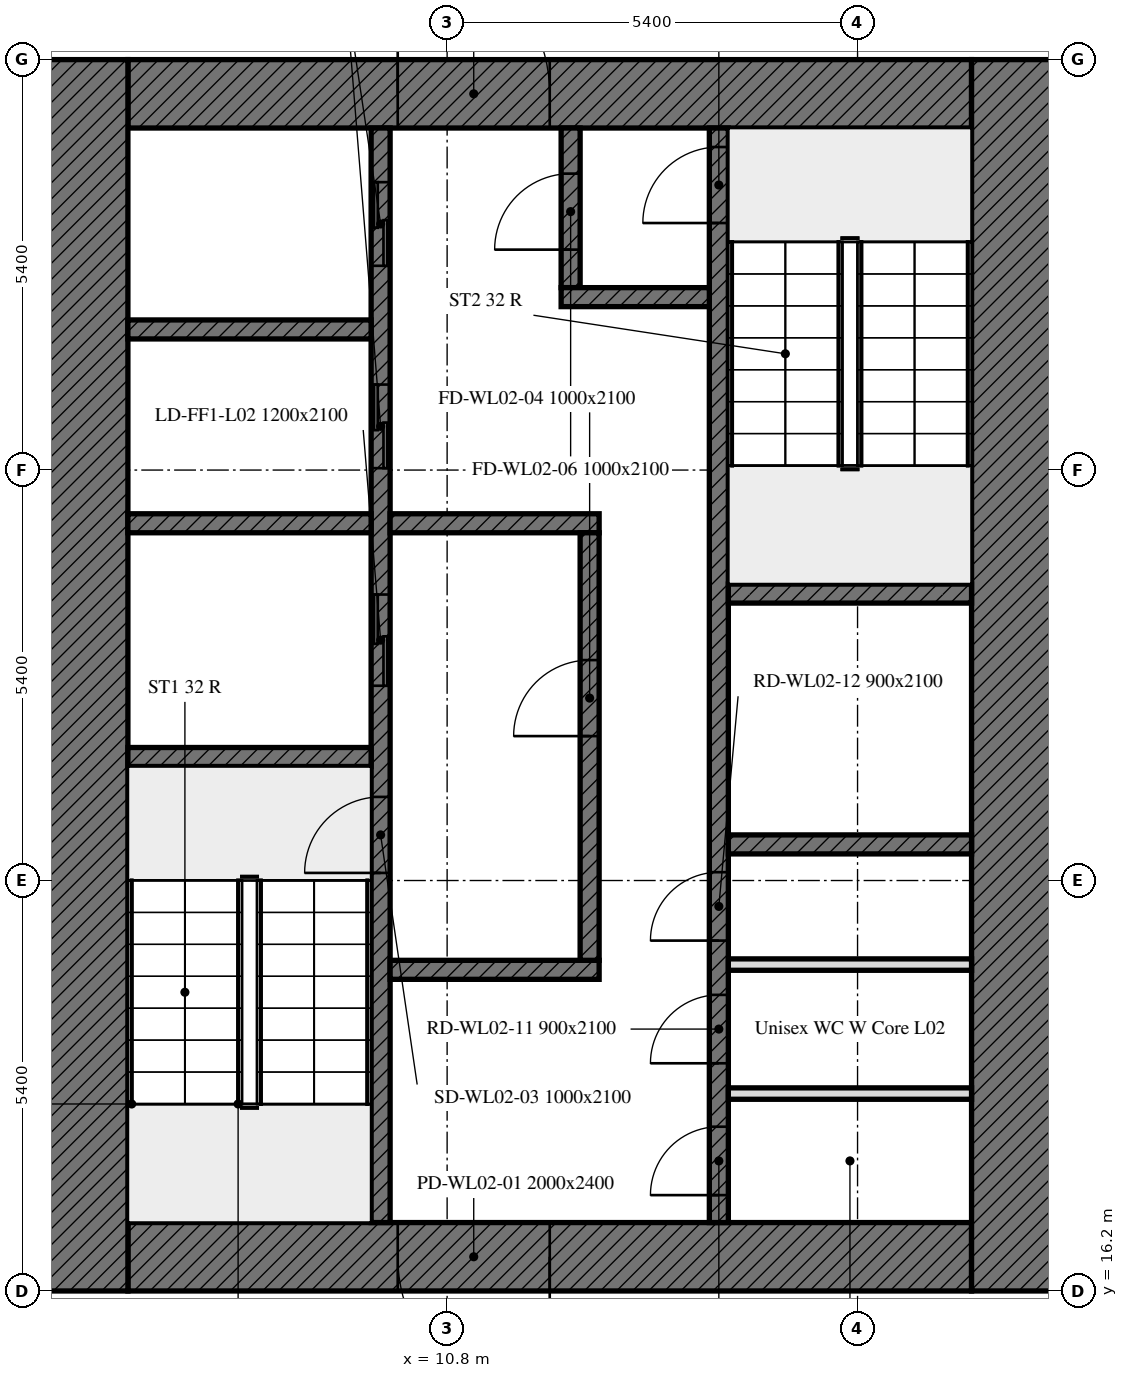
"""IFC4 building model, lengths in metres.
Left out: names, types, materials, properties, quantities, classifications, styles, units other than length and angle.
Written with IfcOpenShell. Run it as: python <this file> out.ifc"""

import sys

from ifc_helpers import new_model, si_unit, direction, frame, frame_2d, origin, place, context, subcontext, project, spatial, rectangle, extrude, element, fill, save


model = new_model("IFC4")
c1 = context("Model", 3, precision=1e-05, world=origin(), true_north=direction((0.0, 1.0)))
c2 = subcontext(c1, "Body", "Model", "MODEL_VIEW")
j1 = project(units=[si_unit("LENGTHUNIT", "METRE"), si_unit("PLANEANGLEUNIT", "RADIAN")], contexts=[c1])
p1 = place(None, origin())
s1 = spatial("IfcSite", under=j1, at=p1, CompositionType="ELEMENT")
p2 = place(p1, origin())
s2 = spatial("IfcBuilding", under=s1, at=p2, CompositionType="ELEMENT")
p3 = place(p2, frame((0.0, 0.0, 14.4)))
s3 = spatial("IfcBuildingStorey", under=s2, at=p3, CompositionType="ELEMENT", Elevation=14.4)
p4 = place(p3, frame((17.7, 16.65, 0.0), z_axis=(0.0, 0.0, 1.0), x_axis=(-1.0, 0.0, 0.0)))
e1 = element("IfcWall", 1, at=p4, inside=s3, PredefinedType="SOLIDWALL", context=c2, shape_type="SweptSolid", body=[
    extrude(rectangle(XDim=11.1, YDim=0.9, at=frame_2d((5.55, 0.0))), origin(), (0.0, 0.0, 1.0), 5.0),
])
p5 = place(p4, frame((5.55, 0.0, 0.0)))
e2 = element("IfcOpeningElement", 2, at=p5, cuts=e1, PredefinedType="OPENING", context=c2, shape_type="SweptSolid", body=[
    extrude(rectangle(XDim=2.0, YDim=2.4, at=frame_2d((1.0, 1.2))), frame((0.0, 0.45, 0.0), z_axis=(0.0, -1.0, 0.0), x_axis=(1.0, 0.0, 0.0)), (0.0, 0.0, 1.0), 0.9),
])
p6 = place(p3, frame((6.6, 31.95, 0.0), z_axis=(0.0, 0.0, 1.0), x_axis=(1.0, 0.0, 0.0)))
e3 = element("IfcWall", 3, at=p6, inside=s3, PredefinedType="SOLIDWALL", context=c2, shape_type="SweptSolid", body=[
    extrude(rectangle(XDim=11.1, YDim=0.9, at=frame_2d((5.55, 0.0))), origin(), (0.0, 0.0, 1.0), 5.0),
])
p7 = place(p6, frame((3.55, 0.0, 0.0)))
e4 = element("IfcOpeningElement", 4, at=p7, cuts=e3, PredefinedType="OPENING", context=c2, shape_type="SweptSolid", body=[
    extrude(rectangle(XDim=2.0, YDim=2.4, at=frame_2d((1.0, 1.2))), frame((0.0, 0.45, 0.0), z_axis=(0.0, -1.0, 0.0), x_axis=(1.0, 0.0, 0.0)), (0.0, 0.0, 1.0), 0.9),
])
for number, where, z_axis, x_axis in (
    (5, (6.0, 16.2, 0.0), (0.0, 0.0, 1.0), (0.0, 1.0, 0.0)),
    (6, (18.3, 32.4, 0.0), (0.0, 0.0, 1.0), (0.0, -1.0, 0.0)),
):
    element("IfcWall", number, at=place(p3, frame(where, z_axis=z_axis, x_axis=x_axis)), inside=s3, PredefinedType="SOLIDWALL", context=c2, shape_type="SweptSolid", body=[
        extrude(rectangle(XDim=16.2, YDim=1.2, at=frame_2d((8.1, 0.0))), origin(), (0.0, 0.0, 1.0), 5.0),
    ])
p8 = place(p3, frame((9.925, 17.1, 0.0), z_axis=(0.0, 0.0, 1.0), x_axis=(0.0, 1.0, 0.0)))
e7 = element("IfcWall", 7, at=p8, inside=s3, PredefinedType="SOLIDWALL", context=c2, shape_type="SweptSolid", body=[
    extrude(rectangle(XDim=14.4, YDim=0.25, at=frame_2d((7.2, 0.0))), origin(), (0.0, 0.0, 1.0), 5.0),
])
p9 = place(p8, frame((4.6, 0.0, 0.0)))
e8 = element("IfcOpeningElement", 8, at=p9, cuts=e7, PredefinedType="OPENING", context=c2, shape_type="SweptSolid", body=[
    extrude(rectangle(XDim=1.0, YDim=2.1, at=frame_2d((0.5, 1.05))), frame((0.0, 0.125, 0.0), z_axis=(0.0, -1.0, 0.0), x_axis=(1.0, 0.0, 0.0)), (0.0, 0.0, 1.0), 0.25),
])
p10 = place(p8, frame((7.062, 0.0, 0.0)))
e9 = element("IfcOpeningElement", 9, at=p10, cuts=e7, PredefinedType="OPENING", context=c2, shape_type="SweptSolid", body=[
    extrude(rectangle(XDim=1.2, YDim=2.1, at=frame_2d((0.6, 1.05))), frame((0.0, 0.125, 0.0), z_axis=(0.0, -1.0, 0.0), x_axis=(1.0, 0.0, 0.0)), (0.0, 0.0, 1.0), 0.25),
])
p11 = place(p8, frame((9.925, 0.0, 0.0)))
e10 = element("IfcOpeningElement", 10, at=p11, cuts=e7, PredefinedType="OPENING", context=c2, shape_type="SweptSolid", body=[
    extrude(rectangle(XDim=1.1, YDim=2.1, at=frame_2d((0.55, 1.05))), frame((0.0, 0.125, 0.0), z_axis=(0.0, -1.0, 0.0), x_axis=(1.0, 0.0, 0.0)), (0.0, 0.0, 1.0), 0.25),
])
p12 = place(p8, frame((12.587, 0.0, 0.0)))
e11 = element("IfcOpeningElement", 11, at=p12, cuts=e7, PredefinedType="OPENING", context=c2, shape_type="SweptSolid", body=[
    extrude(rectangle(XDim=1.1, YDim=2.1, at=frame_2d((0.55, 1.05))), frame((0.0, 0.125, 0.0), z_axis=(0.0, -1.0, 0.0), x_axis=(1.0, 0.0, 0.0)), (0.0, 0.0, 1.0), 0.25),
])
p13 = place(p3, frame((14.375, 17.1, 0.0), z_axis=(0.0, 0.0, 1.0), x_axis=(0.0, 1.0, 0.0)))
e12 = element("IfcWall", 12, at=p13, inside=s3, PredefinedType="SOLIDWALL", context=c2, shape_type="SweptSolid", body=[
    extrude(rectangle(XDim=14.4, YDim=0.25, at=frame_2d((7.2, 0.0))), origin(), (0.0, 0.0, 1.0), 5.0),
])
p14 = place(p13, frame((13.15, 0.0, 0.0)))
e13 = element("IfcOpeningElement", 13, at=p14, cuts=e12, PredefinedType="OPENING", context=c2, shape_type="SweptSolid", body=[
    extrude(rectangle(XDim=1.0, YDim=2.1, at=frame_2d((0.5, 1.05))), frame((0.0, 0.125, 0.0), z_axis=(0.0, -1.0, 0.0), x_axis=(1.0, 0.0, 0.0)), (0.0, 0.0, 1.0), 0.25),
])
p15 = place(p13, frame((0.361, 0.0, 0.0)))
e14 = element("IfcOpeningElement", 14, at=p15, cuts=e12, PredefinedType="OPENING", context=c2, shape_type="SweptSolid", body=[
    extrude(rectangle(XDim=0.9, YDim=2.1, at=frame_2d((0.45, 1.05))), frame((0.0, 0.125, 0.0), z_axis=(0.0, -1.0, 0.0), x_axis=(1.0, 0.0, 0.0)), (0.0, 0.0, 1.0), 0.25),
])
p16 = place(p13, frame((2.095, 0.0, 0.0)))
e15 = element("IfcOpeningElement", 15, at=p16, cuts=e12, PredefinedType="OPENING", context=c2, shape_type="SweptSolid", body=[
    extrude(rectangle(XDim=0.9, YDim=2.1, at=frame_2d((0.45, 1.05))), frame((0.0, 0.125, 0.0), z_axis=(0.0, -1.0, 0.0), x_axis=(1.0, 0.0, 0.0)), (0.0, 0.0, 1.0), 0.25),
])
p17 = place(p13, frame((3.709, 0.0, 0.0)))
e16 = element("IfcOpeningElement", 16, at=p17, cuts=e12, PredefinedType="OPENING", context=c2, shape_type="SweptSolid", body=[
    extrude(rectangle(XDim=0.9, YDim=2.1, at=frame_2d((0.45, 1.05))), frame((0.0, 0.125, 0.0), z_axis=(0.0, -1.0, 0.0), x_axis=(1.0, 0.0, 0.0)), (0.0, 0.0, 1.0), 0.25),
])
for number, where, z_axis, x_axis in (
    (17, (6.6, 23.225, 0.0), (0.0, 0.0, 1.0), (1.0, 0.0, 0.0)),
    (18, (14.5, 25.375, 0.0), (0.0, 0.0, 1.0), (1.0, 0.0, 0.0)),
    (19, (14.5, 22.075, 0.0), (0.0, 0.0, 1.0), (1.0, 0.0, 0.0)),
    (20, (6.6, 26.3, 0.0), (0.0, 0.0, 1.0), (1.0, 0.0, 0.0)),
):
    element("IfcWall", number, at=place(p3, frame(where, z_axis=z_axis, x_axis=x_axis)), inside=s3, PredefinedType="SOLIDWALL", context=c2, shape_type="SweptSolid", body=[
        extrude(rectangle(XDim=3.2, YDim=0.25, at=frame_2d((1.6, 0.0))), origin(), (0.0, 0.0, 1.0), 5.0),
    ])
for number, where, z_axis, x_axis in (
    (21, (10.05, 26.3, 0.0), (0.0, 0.0, 1.0), (1.0, 0.0, 0.0)),
    (22, (10.05, 20.425, 0.0), (0.0, 0.0, 1.0), (1.0, 0.0, 0.0)),
):
    element("IfcWall", number, at=place(p3, frame(where, z_axis=z_axis, x_axis=x_axis)), inside=s3, PredefinedType="SOLIDWALL", context=c2, shape_type="SweptSolid", body=[
        extrude(rectangle(XDim=2.75, YDim=0.25, at=frame_2d((1.375, 0.0))), origin(), (0.0, 0.0, 1.0), 5.0),
    ])
p18 = place(p3, frame((12.425, 29.4, 0.0), z_axis=(0.0, 0.0, 1.0), x_axis=(0.0, 1.0, 0.0)))
e23 = element("IfcWall", 23, at=p18, inside=s3, PredefinedType="SOLIDWALL", context=c2, shape_type="SweptSolid", body=[
    extrude(rectangle(XDim=2.1, YDim=0.25, at=frame_2d((1.05, 0.0))), origin(), (0.0, 0.0, 1.0), 5.0),
])
p19 = place(p18, frame((0.5, 0.0, 0.0)))
e24 = element("IfcOpeningElement", 24, at=p19, cuts=e23, PredefinedType="OPENING", context=c2, shape_type="SweptSolid", body=[
    extrude(rectangle(XDim=1.0, YDim=2.1, at=frame_2d((0.5, 1.05))), frame((0.0, 0.125, 0.0), z_axis=(0.0, -1.0, 0.0), x_axis=(1.0, 0.0, 0.0)), (0.0, 0.0, 1.0), 0.25),
])
p20 = place(p3, frame((12.3, 29.275, 0.0), z_axis=(0.0, 0.0, 1.0), x_axis=(1.0, 0.0, 0.0)))
e25 = element("IfcWall", 25, at=p20, inside=s3, PredefinedType="SOLIDWALL", context=c2, shape_type="SweptSolid", body=[
    extrude(rectangle(XDim=1.95, YDim=0.25, at=frame_2d((0.975, 0.0))), origin(), (0.0, 0.0, 1.0), 5.0),
])
p21 = place(p3, frame((12.675, 20.55, 0.0), z_axis=(0.0, 0.0, 1.0), x_axis=(0.0, 1.0, 0.0)))
e26 = element("IfcWall", 26, at=p21, inside=s3, PredefinedType="SOLIDWALL", context=c2, shape_type="SweptSolid", body=[
    extrude(rectangle(XDim=5.625, YDim=0.25, at=frame_2d((2.812, 0.0))), origin(), (0.0, 0.0, 1.0), 5.0),
])
p22 = place(p21, frame((2.95, 0.0, 0.0)))
e27 = element("IfcOpeningElement", 27, at=p22, cuts=e26, PredefinedType="OPENING", context=c2, shape_type="SweptSolid", body=[
    extrude(rectangle(XDim=1.0, YDim=2.1, at=frame_2d((0.5, 1.05))), frame((0.0, 0.125, 0.0), z_axis=(0.0, -1.0, 0.0), x_axis=(1.0, 0.0, 0.0)), (0.0, 0.0, 1.0), 0.25),
])
p23 = place(p3, frame((6.6, 28.85, 0.0), z_axis=(0.0, 0.0, 1.0), x_axis=(1.0, 0.0, 0.0)))
e28 = element("IfcWall", 28, at=p23, inside=s3, PredefinedType="SOLIDWALL", context=c2, shape_type="SweptSolid", body=[
    extrude(rectangle(XDim=3.2, YDim=0.25, at=frame_2d((1.6, 0.0))), origin(), (0.0, 0.0, 1.0), 5.0),
])
for number, where, z_axis, x_axis in (
    (29, (14.5, 18.797, 0.0), (0.0, 0.0, 1.0), (1.0, 0.0, 0.0)),
    (30, (14.5, 20.494, 0.0), (0.0, 0.0, 1.0), (1.0, 0.0, 0.0)),
):
    element("IfcWall", number, at=place(p3, frame(where, z_axis=z_axis, x_axis=x_axis)), inside=s3, PredefinedType="PARTITIONING", context=c2, shape_type="SweptSolid", body=[
        extrude(rectangle(XDim=3.2, YDim=0.15, at=frame_2d((1.6, 0.0))), origin(), (0.0, 0.0, 1.0), 5.0),
    ])
p24 = place(p5, origin())
e31 = element("IfcDoor", 31, at=p24, inside=s3, OperationType="DOUBLE_DOOR_SINGLE_SWING", PredefinedType="DOOR", context=c2, shape_type="SweptSolid", body=[
    extrude(rectangle(XDim=2.0, YDim=2.4, at=frame_2d((1.0, 1.2))), frame((0.0, 0.025, 0.0), z_axis=(0.0, -1.0, 0.0), x_axis=(1.0, 0.0, 0.0)), (0.0, 0.0, 1.0), 0.05),
])
fill(e2, e31)
p25 = place(p7, origin())
e32 = element("IfcDoor", 32, at=p25, inside=s3, OperationType="DOUBLE_DOOR_SINGLE_SWING", PredefinedType="DOOR", context=c2, shape_type="SweptSolid", body=[
    extrude(rectangle(XDim=2.0, YDim=2.4, at=frame_2d((1.0, 1.2))), frame((0.0, 0.025, 0.0), z_axis=(0.0, -1.0, 0.0), x_axis=(1.0, 0.0, 0.0)), (0.0, 0.0, 1.0), 0.05),
])
fill(e4, e32)
p26 = place(p9, origin())
e33 = element("IfcDoor", 33, at=p26, inside=s3, OperationType="SINGLE_SWING_LEFT", PredefinedType="DOOR", context=c2, shape_type="SweptSolid", body=[
    extrude(rectangle(XDim=1.0, YDim=2.1, at=frame_2d((0.5, 1.05))), frame((0.0, 0.025, 0.0), z_axis=(0.0, -1.0, 0.0), x_axis=(1.0, 0.0, 0.0)), (0.0, 0.0, 1.0), 0.05),
])
fill(e8, e33)
p27 = place(p22, origin())
e34 = element("IfcDoor", 34, at=p27, inside=s3, OperationType="SINGLE_SWING_LEFT", PredefinedType="DOOR", context=c2, shape_type="SweptSolid", body=[
    extrude(rectangle(XDim=1.0, YDim=2.1, at=frame_2d((0.5, 1.05))), frame((0.0, 0.025, 0.0), z_axis=(0.0, -1.0, 0.0), x_axis=(1.0, 0.0, 0.0)), (0.0, 0.0, 1.0), 0.05),
])
fill(e27, e34)
p28 = place(p14, origin())
e35 = element("IfcDoor", 35, at=p28, inside=s3, OperationType="SINGLE_SWING_LEFT", PredefinedType="DOOR", context=c2, shape_type="SweptSolid", body=[
    extrude(rectangle(XDim=1.0, YDim=2.1, at=frame_2d((0.5, 1.05))), frame((0.0, 0.025, 0.0), z_axis=(0.0, -1.0, 0.0), x_axis=(1.0, 0.0, 0.0)), (0.0, 0.0, 1.0), 0.05),
])
fill(e13, e35)
p29 = place(p19, origin())
e36 = element("IfcDoor", 36, at=p29, inside=s3, OperationType="SINGLE_SWING_LEFT", PredefinedType="DOOR", context=c2, shape_type="SweptSolid", body=[
    extrude(rectangle(XDim=1.0, YDim=2.1, at=frame_2d((0.5, 1.05))), frame((0.0, 0.025, 0.0), z_axis=(0.0, -1.0, 0.0), x_axis=(1.0, 0.0, 0.0)), (0.0, 0.0, 1.0), 0.05),
])
fill(e24, e36)
p30 = place(p10, origin())
e37 = element("IfcDoor", 37, at=p30, inside=s3, OperationType="DOUBLE_DOOR_SLIDING", PredefinedType="DOOR", context=c2, shape_type="SweptSolid", body=[
    extrude(rectangle(XDim=1.2, YDim=2.1, at=frame_2d((0.6, 1.05))), frame((0.0, 0.025, 0.0), z_axis=(0.0, -1.0, 0.0), x_axis=(1.0, 0.0, 0.0)), (0.0, 0.0, 1.0), 0.05),
])
fill(e9, e37)
p31 = place(p11, origin())
e38 = element("IfcDoor", 38, at=p31, inside=s3, OperationType="DOUBLE_DOOR_SLIDING", PredefinedType="DOOR", context=c2, shape_type="SweptSolid", body=[
    extrude(rectangle(XDim=1.1, YDim=2.1, at=frame_2d((0.55, 1.05))), frame((0.0, 0.025, 0.0), z_axis=(0.0, -1.0, 0.0), x_axis=(1.0, 0.0, 0.0)), (0.0, 0.0, 1.0), 0.05),
])
fill(e10, e38)
p32 = place(p12, origin())
e39 = element("IfcDoor", 39, at=p32, inside=s3, OperationType="DOUBLE_DOOR_SLIDING", PredefinedType="DOOR", context=c2, shape_type="SweptSolid", body=[
    extrude(rectangle(XDim=1.1, YDim=2.1, at=frame_2d((0.55, 1.05))), frame((0.0, 0.025, 0.0), z_axis=(0.0, -1.0, 0.0), x_axis=(1.0, 0.0, 0.0)), (0.0, 0.0, 1.0), 0.05),
])
fill(e11, e39)
p33 = place(p15, origin())
e40 = element("IfcDoor", 40, at=p33, inside=s3, OperationType="SINGLE_SWING_LEFT", PredefinedType="DOOR", context=c2, shape_type="SweptSolid", body=[
    extrude(rectangle(XDim=0.9, YDim=2.1, at=frame_2d((0.45, 1.05))), frame((0.0, 0.025, 0.0), z_axis=(0.0, -1.0, 0.0), x_axis=(1.0, 0.0, 0.0)), (0.0, 0.0, 1.0), 0.05),
])
fill(e14, e40)
p34 = place(p16, origin())
e41 = element("IfcDoor", 41, at=p34, inside=s3, OperationType="SINGLE_SWING_LEFT", PredefinedType="DOOR", context=c2, shape_type="SweptSolid", body=[
    extrude(rectangle(XDim=0.9, YDim=2.1, at=frame_2d((0.45, 1.05))), frame((0.0, 0.025, 0.0), z_axis=(0.0, -1.0, 0.0), x_axis=(1.0, 0.0, 0.0)), (0.0, 0.0, 1.0), 0.05),
])
fill(e15, e41)
p35 = place(p17, origin())
e42 = element("IfcDoor", 42, at=p35, inside=s3, OperationType="SINGLE_SWING_LEFT", PredefinedType="DOOR", context=c2, shape_type="SweptSolid", body=[
    extrude(rectangle(XDim=0.9, YDim=2.1, at=frame_2d((0.45, 1.05))), frame((0.0, 0.025, 0.0), z_axis=(0.0, -1.0, 0.0), x_axis=(1.0, 0.0, 0.0)), (0.0, 0.0, 1.0), 0.05),
])
fill(e16, e42)
save(model, sys.argv[1])
